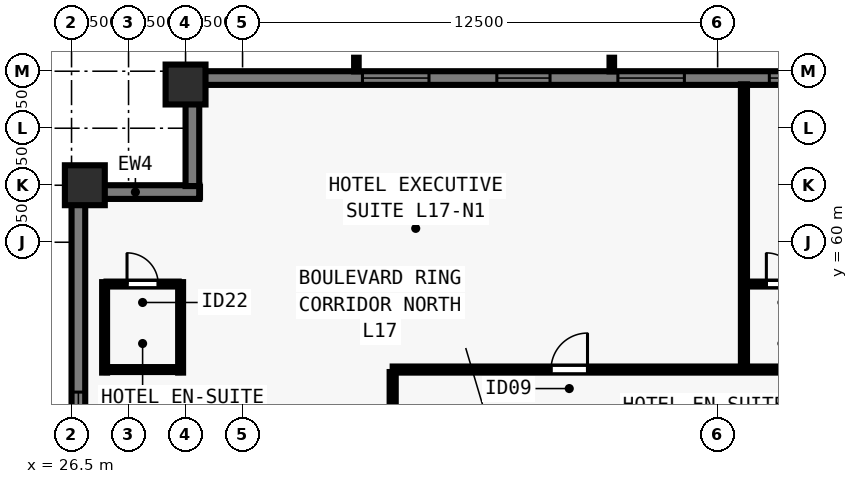
"""IFC4 building model, lengths in metres.
Left out: names, types, materials, properties, quantities, classifications, styles, units other than length and angle.
Written with IfcOpenShell. Run it as: python <this file> out.ifc"""

import sys

from ifc_helpers import new_model, si_unit, direction, frame, frame_2d, origin, origin_2d, place, context, subcontext, project, spatial, rectangle, extrude, element, fill, save


model = new_model("IFC4")
c1 = context("Model", 3, precision=1e-05, world=origin(), true_north=direction((0.0, 1.0)))
c2 = subcontext(c1, "Body", "Model", "MODEL_VIEW")
j1 = project(units=[si_unit("LENGTHUNIT", "METRE"), si_unit("PLANEANGLEUNIT", "RADIAN")], contexts=[c1])
p1 = place(None, origin())
s1 = spatial("IfcSite", under=j1, at=p1, CompositionType="ELEMENT")
p2 = place(p1, origin())
s2 = spatial("IfcBuilding", under=s1, at=p2, CompositionType="ELEMENT")
p3 = place(p2, frame((0.0, 0.0, 65.5)))
s3 = spatial("IfcBuildingStorey", under=s2, at=p3, CompositionType="ELEMENT", Elevation=65.5)
for number, where, z_axis, x_axis in (
    (1, (29.5, 64.15, 0.0), (0.0, 0.0, 1.0), (1.0, 0.0, 0.0)),
    (2, (26.85, 61.5, 0.0), (0.0, 0.0, 1.0), (0.0, 1.0, 0.0)),
):
    element("IfcColumn", number, at=place(p3, frame(where, z_axis=z_axis, x_axis=x_axis)), inside=s3, PredefinedType="COLUMN", context=c2, shape_type="SweptSolid", body=[
        extrude(rectangle(XDim=1.05, YDim=1.05, at=origin_2d()), origin(), (0.0, 0.0, 1.0), 3.5),
    ])
p4 = place(p3, frame((26.68, 16.5, 0.0), z_axis=(0.0, 0.0, 1.0), x_axis=(0.0, 1.0, 0.0)))
e3 = element("IfcWall", 3, at=p4, inside=s3, PredefinedType="SOLIDWALL", context=c2, shape_type="SweptSolid", body=[
    extrude(rectangle(XDim=44.662, YDim=0.36, at=frame_2d((22.331, 0.0))), origin(), (0.0, 0.0, 1.0), 3.28),
])
p5 = place(p4, frame((5.505, 0.0, 0.8)))
e4 = element("IfcOpeningElement", 4, at=p5, cuts=e3, PredefinedType="OPENING", context=c2, shape_type="SweptSolid", body=[
    extrude(rectangle(XDim=1.75, YDim=1.544, at=frame_2d((0.875, 0.772))), frame((0.0, 0.19, 0.0), z_axis=(0.0, -1.0, 0.0), x_axis=(1.0, 0.0, 0.0)), (0.0, 0.0, 1.0), 0.38),
])
p6 = place(p4, frame((8.19, 0.0, 0.8)))
e5 = element("IfcOpeningElement", 5, at=p6, cuts=e3, PredefinedType="OPENING", context=c2, shape_type="SweptSolid", body=[
    extrude(rectangle(XDim=1.4, YDim=1.544, at=frame_2d((0.7, 0.772))), frame((0.0, 0.19, 0.0), z_axis=(0.0, -1.0, 0.0), x_axis=(1.0, 0.0, 0.0)), (0.0, 0.0, 1.0), 0.38),
])
p7 = place(p4, frame((11.375, 0.0, 0.8)))
e6 = element("IfcOpeningElement", 6, at=p7, cuts=e3, PredefinedType="OPENING", context=c2, shape_type="SweptSolid", body=[
    extrude(rectangle(XDim=1.75, YDim=1.544, at=frame_2d((0.875, 0.772))), frame((0.0, 0.19, 0.0), z_axis=(0.0, -1.0, 0.0), x_axis=(1.0, 0.0, 0.0)), (0.0, 0.0, 1.0), 0.38),
])
p8 = place(p4, frame((14.911, 0.0, 0.8)))
e7 = element("IfcOpeningElement", 7, at=p8, cuts=e3, PredefinedType="OPENING", context=c2, shape_type="SweptSolid", body=[
    extrude(rectangle(XDim=1.4, YDim=1.544, at=frame_2d((0.7, 0.772))), frame((0.0, 0.19, 0.0), z_axis=(0.0, -1.0, 0.0), x_axis=(1.0, 0.0, 0.0)), (0.0, 0.0, 1.0), 0.38),
])
p9 = place(p4, frame((18.546, 0.0, 0.8)))
e8 = element("IfcOpeningElement", 8, at=p9, cuts=e3, PredefinedType="OPENING", context=c2, shape_type="SweptSolid", body=[
    extrude(rectangle(XDim=1.75, YDim=1.544, at=frame_2d((0.875, 0.772))), frame((0.0, 0.19, 0.0), z_axis=(0.0, -1.0, 0.0), x_axis=(1.0, 0.0, 0.0)), (0.0, 0.0, 1.0), 0.38),
])
p10 = place(p4, frame((22.481, 0.0, 0.8)))
e9 = element("IfcOpeningElement", 9, at=p10, cuts=e3, PredefinedType="OPENING", context=c2, shape_type="SweptSolid", body=[
    extrude(rectangle(XDim=1.4, YDim=1.544, at=frame_2d((0.7, 0.772))), frame((0.0, 0.19, 0.0), z_axis=(0.0, -1.0, 0.0), x_axis=(1.0, 0.0, 0.0)), (0.0, 0.0, 1.0), 0.38),
])
p11 = place(p4, frame((24.366, 0.0, 0.8)))
e10 = element("IfcOpeningElement", 10, at=p11, cuts=e3, PredefinedType="OPENING", context=c2, shape_type="SweptSolid", body=[
    extrude(rectangle(XDim=1.75, YDim=1.544, at=frame_2d((0.875, 0.772))), frame((0.0, 0.19, 0.0), z_axis=(0.0, -1.0, 0.0), x_axis=(1.0, 0.0, 0.0)), (0.0, 0.0, 1.0), 0.38),
])
p12 = place(p4, frame((28.351, 0.0, 0.8)))
e11 = element("IfcOpeningElement", 11, at=p12, cuts=e3, PredefinedType="OPENING", context=c2, shape_type="SweptSolid", body=[
    extrude(rectangle(XDim=1.4, YDim=1.544, at=frame_2d((0.7, 0.772))), frame((0.0, 0.19, 0.0), z_axis=(0.0, -1.0, 0.0), x_axis=(1.0, 0.0, 0.0)), (0.0, 0.0, 1.0), 0.38),
])
p13 = place(p4, frame((31.537, 0.0, 0.8)))
e12 = element("IfcOpeningElement", 12, at=p13, cuts=e3, PredefinedType="OPENING", context=c2, shape_type="SweptSolid", body=[
    extrude(rectangle(XDim=1.75, YDim=1.544, at=frame_2d((0.875, 0.772))), frame((0.0, 0.19, 0.0), z_axis=(0.0, -1.0, 0.0), x_axis=(1.0, 0.0, 0.0)), (0.0, 0.0, 1.0), 0.38),
])
p14 = place(p4, frame((35.072, 0.0, 0.8)))
e13 = element("IfcOpeningElement", 13, at=p14, cuts=e3, PredefinedType="OPENING", context=c2, shape_type="SweptSolid", body=[
    extrude(rectangle(XDim=1.4, YDim=1.544, at=frame_2d((0.7, 0.772))), frame((0.0, 0.19, 0.0), z_axis=(0.0, -1.0, 0.0), x_axis=(1.0, 0.0, 0.0)), (0.0, 0.0, 1.0), 0.38),
])
p15 = place(p4, frame((37.807, 0.0, 0.8)))
e14 = element("IfcOpeningElement", 14, at=p15, cuts=e3, PredefinedType="OPENING", context=c2, shape_type="SweptSolid", body=[
    extrude(rectangle(XDim=1.75, YDim=1.544, at=frame_2d((0.875, 0.772))), frame((0.0, 0.19, 0.0), z_axis=(0.0, -1.0, 0.0), x_axis=(1.0, 0.0, 0.0)), (0.0, 0.0, 1.0), 0.38),
])
p16 = place(p3, frame((26.5, 61.32, 0.0), z_axis=(0.0, 0.0, 1.0), x_axis=(1.0, 0.0, 0.0)))
e15 = element("IfcWall", 15, at=p16, inside=s3, PredefinedType="SOLIDWALL", context=c2, shape_type="SweptSolid", body=[
    extrude(rectangle(XDim=3.36, YDim=0.36, at=frame_2d((1.68, 0.0))), origin(), (0.0, 0.0, 1.0), 3.28),
])
p17 = place(p3, frame((29.68, 61.478, 0.0), z_axis=(0.0, 0.0, 1.0), x_axis=(0.0, 1.0, 0.0)))
e16 = element("IfcWall", 16, at=p17, inside=s3, PredefinedType="SOLIDWALL", context=c2, shape_type="SweptSolid", body=[
    extrude(rectangle(XDim=2.684, YDim=0.36, at=frame_2d((1.342, 0.0))), origin(), (0.0, 0.0, 1.0), 3.28),
])
p18 = place(p3, frame((29.5, 64.32, 0.0), z_axis=(0.0, 0.0, 1.0), x_axis=(1.0, 0.0, 0.0)))
e17 = element("IfcWall", 17, at=p18, inside=s3, PredefinedType="SOLIDWALL", context=c2, shape_type="SweptSolid", body=[
    extrude(rectangle(XDim=44.662, YDim=0.36, at=frame_2d((22.331, 0.0))), origin(), (0.0, 0.0, 1.0), 3.28),
])
p19 = place(p18, frame((4.655, 0.0, 0.8)))
e18 = element("IfcOpeningElement", 18, at=p19, cuts=e17, PredefinedType="OPENING", context=c2, shape_type="SweptSolid", body=[
    extrude(rectangle(XDim=1.75, YDim=1.544, at=frame_2d((0.875, 0.772))), frame((0.0, 0.19, 0.0), z_axis=(0.0, -1.0, 0.0), x_axis=(1.0, 0.0, 0.0)), (0.0, 0.0, 1.0), 0.38),
])
p20 = place(p18, frame((8.19, 0.0, 0.8)))
e19 = element("IfcOpeningElement", 19, at=p20, cuts=e17, PredefinedType="OPENING", context=c2, shape_type="SweptSolid", body=[
    extrude(rectangle(XDim=1.4, YDim=1.544, at=frame_2d((0.7, 0.772))), frame((0.0, 0.19, 0.0), z_axis=(0.0, -1.0, 0.0), x_axis=(1.0, 0.0, 0.0)), (0.0, 0.0, 1.0), 0.38),
])
p21 = place(p18, frame((11.375, 0.0, 0.8)))
e20 = element("IfcOpeningElement", 20, at=p21, cuts=e17, PredefinedType="OPENING", context=c2, shape_type="SweptSolid", body=[
    extrude(rectangle(XDim=1.75, YDim=1.544, at=frame_2d((0.875, 0.772))), frame((0.0, 0.19, 0.0), z_axis=(0.0, -1.0, 0.0), x_axis=(1.0, 0.0, 0.0)), (0.0, 0.0, 1.0), 0.38),
])
p22 = place(p18, frame((15.361, 0.0, 0.8)))
e21 = element("IfcOpeningElement", 21, at=p22, cuts=e17, PredefinedType="OPENING", context=c2, shape_type="SweptSolid", body=[
    extrude(rectangle(XDim=1.4, YDim=1.544, at=frame_2d((0.7, 0.772))), frame((0.0, 0.19, 0.0), z_axis=(0.0, -1.0, 0.0), x_axis=(1.0, 0.0, 0.0)), (0.0, 0.0, 1.0), 0.38),
])
p23 = place(p18, frame((18.546, 0.0, 0.8)))
e22 = element("IfcOpeningElement", 22, at=p23, cuts=e17, PredefinedType="OPENING", context=c2, shape_type="SweptSolid", body=[
    extrude(rectangle(XDim=1.75, YDim=1.544, at=frame_2d((0.875, 0.772))), frame((0.0, 0.19, 0.0), z_axis=(0.0, -1.0, 0.0), x_axis=(1.0, 0.0, 0.0)), (0.0, 0.0, 1.0), 0.38),
])
p24 = place(p18, frame((21.631, 0.0, 0.8)))
e23 = element("IfcOpeningElement", 23, at=p24, cuts=e17, PredefinedType="OPENING", context=c2, shape_type="SweptSolid", body=[
    extrude(rectangle(XDim=1.4, YDim=1.544, at=frame_2d((0.7, 0.772))), frame((0.0, 0.19, 0.0), z_axis=(0.0, -1.0, 0.0), x_axis=(1.0, 0.0, 0.0)), (0.0, 0.0, 1.0), 0.38),
])
p25 = place(p18, frame((24.366, 0.0, 0.8)))
e24 = element("IfcOpeningElement", 24, at=p25, cuts=e17, PredefinedType="OPENING", context=c2, shape_type="SweptSolid", body=[
    extrude(rectangle(XDim=1.75, YDim=1.544, at=frame_2d((0.875, 0.772))), frame((0.0, 0.19, 0.0), z_axis=(0.0, -1.0, 0.0), x_axis=(1.0, 0.0, 0.0)), (0.0, 0.0, 1.0), 0.38),
])
p26 = place(p18, frame((28.351, 0.0, 0.8)))
e25 = element("IfcOpeningElement", 25, at=p26, cuts=e17, PredefinedType="OPENING", context=c2, shape_type="SweptSolid", body=[
    extrude(rectangle(XDim=1.4, YDim=1.544, at=frame_2d((0.7, 0.772))), frame((0.0, 0.19, 0.0), z_axis=(0.0, -1.0, 0.0), x_axis=(1.0, 0.0, 0.0)), (0.0, 0.0, 1.0), 0.38),
])
p27 = place(p18, frame((31.537, 0.0, 0.8)))
e26 = element("IfcOpeningElement", 26, at=p27, cuts=e17, PredefinedType="OPENING", context=c2, shape_type="SweptSolid", body=[
    extrude(rectangle(XDim=1.75, YDim=1.544, at=frame_2d((0.875, 0.772))), frame((0.0, 0.19, 0.0), z_axis=(0.0, -1.0, 0.0), x_axis=(1.0, 0.0, 0.0)), (0.0, 0.0, 1.0), 0.38),
])
p28 = place(p18, frame((35.072, 0.0, 0.8)))
e27 = element("IfcOpeningElement", 27, at=p28, cuts=e17, PredefinedType="OPENING", context=c2, shape_type="SweptSolid", body=[
    extrude(rectangle(XDim=1.4, YDim=1.544, at=frame_2d((0.7, 0.772))), frame((0.0, 0.19, 0.0), z_axis=(0.0, -1.0, 0.0), x_axis=(1.0, 0.0, 0.0)), (0.0, 0.0, 1.0), 0.38),
])
p29 = place(p18, frame((38.257, 0.0, 0.8)))
e28 = element("IfcOpeningElement", 28, at=p29, cuts=e17, PredefinedType="OPENING", context=c2, shape_type="SweptSolid", body=[
    extrude(rectangle(XDim=1.75, YDim=1.544, at=frame_2d((0.875, 0.772))), frame((0.0, 0.19, 0.0), z_axis=(0.0, -1.0, 0.0), x_axis=(1.0, 0.0, 0.0)), (0.0, 0.0, 1.0), 0.38),
])
p30 = place(p3, frame((34.95, 56.65, 0.0), z_axis=(0.0, 0.0, 1.0), x_axis=(1.0, 0.0, 0.0)))
e29 = element("IfcWall", 29, at=p30, inside=s3, PredefinedType="PARTITIONING", context=c2, shape_type="SweptSolid", body=[
    extrude(rectangle(XDim=34.1, YDim=0.16, at=frame_2d((17.05, 0.0))), origin(), (0.0, 0.0, 1.0), 3.28),
])
p31 = place(p30, frame((4.166, 0.0, 0.0)))
e30 = element("IfcOpeningElement", 30, at=p31, cuts=e29, PredefinedType="OPENING", context=c2, shape_type="SweptSolid", body=[
    extrude(rectangle(XDim=0.96, YDim=2.15, at=frame_2d((0.48, 1.075))), frame((0.0, 0.09, 0.0), z_axis=(0.0, -1.0, 0.0), x_axis=(1.0, 0.0, 0.0)), (0.0, 0.0, 1.0), 0.18),
])
p32 = place(p30, frame((17.73, 0.0, 0.0)))
e31 = element("IfcOpeningElement", 31, at=p32, cuts=e29, PredefinedType="OPENING", context=c2, shape_type="SweptSolid", body=[
    extrude(rectangle(XDim=0.96, YDim=2.15, at=frame_2d((0.48, 1.075))), frame((0.0, 0.09, 0.0), z_axis=(0.0, -1.0, 0.0), x_axis=(1.0, 0.0, 0.0)), (0.0, 0.0, 1.0), 0.18),
])
p33 = place(p30, frame((30.134, 0.0, 0.0)))
e32 = element("IfcOpeningElement", 32, at=p33, cuts=e29, PredefinedType="OPENING", context=c2, shape_type="SweptSolid", body=[
    extrude(rectangle(XDim=0.96, YDim=2.15, at=frame_2d((0.48, 1.075))), frame((0.0, 0.09, 0.0), z_axis=(0.0, -1.0, 0.0), x_axis=(1.0, 0.0, 0.0)), (0.0, 0.0, 1.0), 0.18),
])
p34 = place(p3, frame((34.95, 21.415, 0.0), z_axis=(0.0, 0.0, 1.0), x_axis=(0.0, 1.0, 0.0)))
e33 = element("IfcWall", 33, at=p34, inside=s3, PredefinedType="PARTITIONING", context=c2, shape_type="SweptSolid", body=[
    extrude(rectangle(XDim=35.17, YDim=0.16, at=frame_2d((17.585, 0.0))), origin(), (0.0, 0.0, 1.0), 3.28),
])
p35 = place(p34, frame((9.414, 0.0, 0.0)))
e34 = element("IfcOpeningElement", 34, at=p35, cuts=e33, PredefinedType="OPENING", context=c2, shape_type="SweptSolid", body=[
    extrude(rectangle(XDim=0.96, YDim=2.15, at=frame_2d((0.48, 1.075))), frame((0.0, 0.09, 0.0), z_axis=(0.0, -1.0, 0.0), x_axis=(1.0, 0.0, 0.0)), (0.0, 0.0, 1.0), 0.18),
])
p36 = place(p34, frame((26.814, 0.0, 0.0)))
e35 = element("IfcOpeningElement", 35, at=p36, cuts=e33, PredefinedType="OPENING", context=c2, shape_type="SweptSolid", body=[
    extrude(rectangle(XDim=0.96, YDim=2.15, at=frame_2d((0.48, 1.075))), frame((0.0, 0.09, 0.0), z_axis=(0.0, -1.0, 0.0), x_axis=(1.0, 0.0, 0.0)), (0.0, 0.0, 1.0), 0.18),
])
for number, where, z_axis, x_axis in (
    (36, (27.37, 56.57, 0.0), (0.0, 0.0, 1.0), (0.0, 1.0, 0.0)),
    (37, (29.37, 56.57, 0.0), (0.0, 0.0, 1.0), (0.0, 1.0, 0.0)),
):
    element("IfcWall", number, at=place(p3, frame(where, z_axis=z_axis, x_axis=x_axis)), inside=s3, PredefinedType="PLUMBINGWALL", context=c2, shape_type="SweptSolid", body=[
        extrude(rectangle(XDim=2.38, YDim=0.13, at=frame_2d((1.19, 0.0))), origin(), (0.0, 0.0, 1.0), 3.28),
    ])
p37 = place(p3, frame((27.42, 58.9, 0.0), z_axis=(0.0, 0.0, 1.0), x_axis=(1.0, 0.0, 0.0)))
e38 = element("IfcWall", 38, at=p37, inside=s3, PredefinedType="PLUMBINGWALL", context=c2, shape_type="SweptSolid", body=[
    extrude(rectangle(XDim=1.9, YDim=0.13, at=frame_2d((0.95, 0.0))), origin(), (0.0, 0.0, 1.0), 3.28),
])
p38 = place(p37, frame((0.54, 0.0, 0.0)))
e39 = element("IfcOpeningElement", 39, at=p38, cuts=e38, PredefinedType="OPENING", context=c2, shape_type="SweptSolid", body=[
    extrude(rectangle(XDim=0.82, YDim=2.1, at=frame_2d((0.41, 1.05))), frame((0.0, 0.075, 0.0), z_axis=(0.0, -1.0, 0.0), x_axis=(1.0, 0.0, 0.0)), (0.0, 0.0, 1.0), 0.15),
])
p39 = place(p3, frame((27.42, 56.65, 0.0), z_axis=(0.0, 0.0, 1.0), x_axis=(1.0, 0.0, 0.0)))
e40 = element("IfcWall", 40, at=p39, inside=s3, PredefinedType="PLUMBINGWALL", context=c2, shape_type="SweptSolid", body=[
    extrude(rectangle(XDim=1.9, YDim=0.13, at=frame_2d((0.95, 0.0))), origin(), (0.0, 0.0, 1.0), 3.28),
])
p40 = place(p3, frame((44.192, 56.715, 0.0), z_axis=(0.0, 0.0, 1.0), x_axis=(0.0, 1.0, 0.0)))
e41 = element("IfcWall", 41, at=p40, inside=s3, PredefinedType="PARTITIONING", context=c2, shape_type="SweptSolid", body=[
    extrude(rectangle(XDim=7.44, YDim=0.16, at=frame_2d((3.72, 0.0))), origin(), (0.0, 0.0, 1.0), 3.28),
])
p41 = place(p3, frame((44.258, 58.9, 0.0), z_axis=(0.0, 0.0, 1.0), x_axis=(1.0, 0.0, 0.0)))
e42 = element("IfcWall", 42, at=p41, inside=s3, PredefinedType="PLUMBINGWALL", context=c2, shape_type="SweptSolid", body=[
    extrude(rectangle(XDim=1.885, YDim=0.13, at=frame_2d((0.942, 0.0))), origin(), (0.0, 0.0, 1.0), 3.28),
])
p42 = place(p41, frame((0.525, 0.0, 0.0)))
e43 = element("IfcOpeningElement", 43, at=p42, cuts=e42, PredefinedType="OPENING", context=c2, shape_type="SweptSolid", body=[
    extrude(rectangle(XDim=0.82, YDim=2.1, at=frame_2d((0.41, 1.05))), frame((0.0, 0.075, 0.0), z_axis=(0.0, -1.0, 0.0), x_axis=(1.0, 0.0, 0.0)), (0.0, 0.0, 1.0), 0.15),
])
p43 = place(p15, origin())
e44 = element("IfcWindow", 44, at=p43, inside=s3, PartitioningType="SINGLE_PANEL", PredefinedType="WINDOW", context=c2, shape_type="SweptSolid", body=[
    extrude(rectangle(XDim=1.75, YDim=1.544, at=frame_2d((0.875, 0.772))), frame((0.0, -0.05, 0.0), z_axis=(0.0, -1.0, 0.0), x_axis=(1.0, 0.0, 0.0)), (0.0, 0.0, 1.0), 0.06),
])
fill(e14, e44)
p44 = place(p19, origin())
e45 = element("IfcWindow", 45, at=p44, inside=s3, PartitioningType="SINGLE_PANEL", PredefinedType="WINDOW", context=c2, shape_type="SweptSolid", body=[
    extrude(rectangle(XDim=1.75, YDim=1.544, at=frame_2d((0.875, 0.772))), frame((0.0, -0.05, 0.0), z_axis=(0.0, -1.0, 0.0), x_axis=(1.0, 0.0, 0.0)), (0.0, 0.0, 1.0), 0.06),
])
fill(e18, e45)
p45 = place(p20, origin())
e46 = element("IfcWindow", 46, at=p45, inside=s3, PartitioningType="SINGLE_PANEL", PredefinedType="WINDOW", context=c2, shape_type="SweptSolid", body=[
    extrude(rectangle(XDim=1.4, YDim=1.544, at=frame_2d((0.7, 0.772))), frame((0.0, -0.05, 0.0), z_axis=(0.0, -1.0, 0.0), x_axis=(1.0, 0.0, 0.0)), (0.0, 0.0, 1.0), 0.06),
])
fill(e19, e46)
p46 = place(p21, origin())
e47 = element("IfcWindow", 47, at=p46, inside=s3, PartitioningType="SINGLE_PANEL", PredefinedType="WINDOW", context=c2, shape_type="SweptSolid", body=[
    extrude(rectangle(XDim=1.75, YDim=1.544, at=frame_2d((0.875, 0.772))), frame((0.0, -0.05, 0.0), z_axis=(0.0, -1.0, 0.0), x_axis=(1.0, 0.0, 0.0)), (0.0, 0.0, 1.0), 0.06),
])
fill(e20, e47)
p47 = place(p22, origin())
e48 = element("IfcWindow", 48, at=p47, inside=s3, PartitioningType="SINGLE_PANEL", PredefinedType="WINDOW", context=c2, shape_type="SweptSolid", body=[
    extrude(rectangle(XDim=1.4, YDim=1.544, at=frame_2d((0.7, 0.772))), frame((0.0, -0.05, 0.0), z_axis=(0.0, -1.0, 0.0), x_axis=(1.0, 0.0, 0.0)), (0.0, 0.0, 1.0), 0.06),
])
fill(e21, e48)
p48 = place(p38, origin())
e49 = element("IfcDoor", 49, at=p48, inside=s3, OperationType="SINGLE_SWING_LEFT", PredefinedType="DOOR", context=c2, shape_type="SweptSolid", body=[
    extrude(rectangle(XDim=0.82, YDim=2.1, at=frame_2d((0.41, 1.05))), frame((0.0, 0.025, 0.0), z_axis=(0.0, -1.0, 0.0), x_axis=(1.0, 0.0, 0.0)), (0.0, 0.0, 1.0), 0.05),
])
fill(e39, e49)
p49 = place(p31, origin())
e50 = element("IfcDoor", 50, at=p49, inside=s3, OperationType="SINGLE_SWING_RIGHT", PredefinedType="DOOR", context=c2, shape_type="SweptSolid", body=[
    extrude(rectangle(XDim=0.96, YDim=2.15, at=frame_2d((0.48, 1.075))), frame((0.0, 0.025, 0.0), z_axis=(0.0, -1.0, 0.0), x_axis=(1.0, 0.0, 0.0)), (0.0, 0.0, 1.0), 0.05),
])
fill(e30, e50)
p50 = place(p42, origin())
e51 = element("IfcDoor", 51, at=p50, inside=s3, OperationType="SINGLE_SWING_LEFT", PredefinedType="DOOR", context=c2, shape_type="SweptSolid", body=[
    extrude(rectangle(XDim=0.82, YDim=2.1, at=frame_2d((0.41, 1.05))), frame((0.0, 0.025, 0.0), z_axis=(0.0, -1.0, 0.0), x_axis=(1.0, 0.0, 0.0)), (0.0, 0.0, 1.0), 0.05),
])
fill(e43, e51)
save(model, sys.argv[1])
